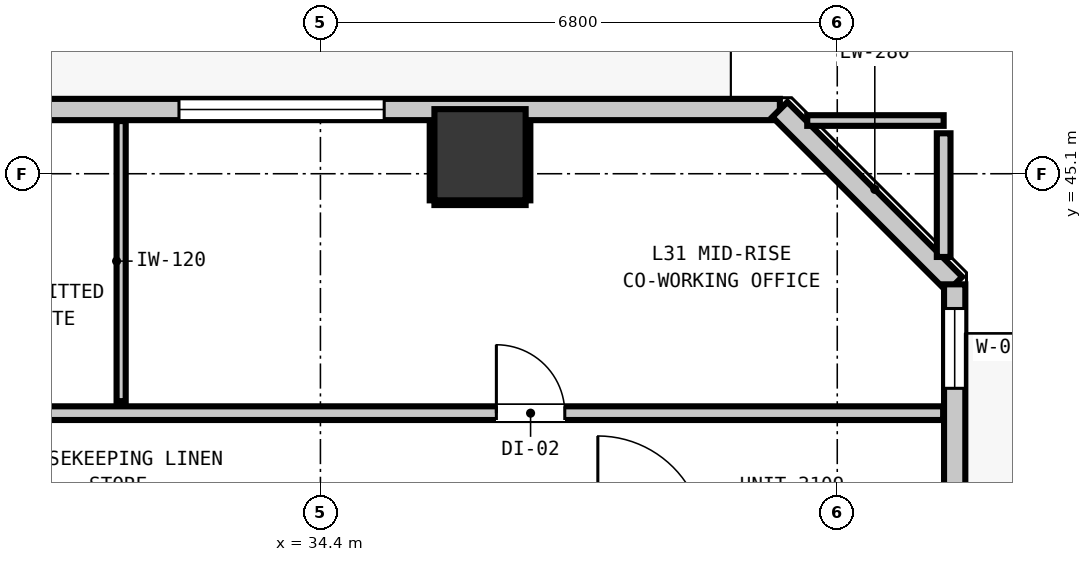
"""IFC4 building model, lengths in metres.
Left out: names, types, materials, properties, quantities, classifications, styles, units other than length and angle.
Written with IfcOpenShell. Run it as: python <this file> out.ifc"""

import sys

from ifc_helpers import new_model, si_unit, direction, frame, frame_2d, origin, origin_2d, place, context, subcontext, project, spatial, rectangle, extrude, element, fill, save


model = new_model("IFC4")
c1 = context("Model", 3, precision=1e-05, world=origin(), true_north=direction((0.0, 1.0)))
c2 = subcontext(c1, "Body", "Model", "MODEL_VIEW")
j1 = project(units=[si_unit("LENGTHUNIT", "METRE"), si_unit("PLANEANGLEUNIT", "RADIAN")], contexts=[c1])
p1 = place(None, origin())
s1 = spatial("IfcSite", under=j1, at=p1, CompositionType="ELEMENT")
p2 = place(p1, origin())
s2 = spatial("IfcBuilding", under=s1, at=p2, CompositionType="ELEMENT")
p3 = place(p2, frame((0.0, 0.0, 109.4)))
s3 = spatial("IfcBuildingStorey", under=s2, at=p3, CompositionType="ELEMENT", Elevation=109.4)
p4 = place(p3, frame((36.5, 45.35, 0.0), z_axis=(0.0, 0.0, 1.0), x_axis=(1.0, 0.0, 0.0)))
e1 = element("IfcColumn", 1, at=p4, inside=s3, PredefinedType="COLUMN", context=c2, shape_type="SweptSolid", body=[
    extrude(rectangle(XDim=1.2, YDim=1.2, at=origin_2d()), origin(), (0.0, 0.0, 1.0), 3.32),
])
p5 = place(p3, frame((5.355, 45.945, 0.0), z_axis=(0.0, 0.0, 1.0), x_axis=(1.0, 0.0, 0.0)))
e2 = element("IfcWall", 2, at=p5, inside=s3, PredefinedType="STANDARD", context=c2, shape_type="SweptSolid", body=[
    extrude(rectangle(XDim=35.09, YDim=0.28, at=frame_2d((17.545, 0.0))), origin(), (0.0, 0.0, 1.0), 3.08),
])
p6 = place(p5, frame((0.904, 0.0, 0.0)))
e3 = element("IfcOpeningElement", 3, at=p6, cuts=e2, PredefinedType="OPENING", context=c2, shape_type="SweptSolid", body=[
    extrude(rectangle(XDim=1.0, YDim=2.15, at=frame_2d((0.5, 1.075))), frame((0.0, 0.15, 0.0), z_axis=(0.0, -1.0, 0.0), x_axis=(1.0, 0.0, 0.0)), (0.0, 0.0, 1.0), 0.3),
])
p7 = place(p5, frame((3.424, 0.0, 0.85)))
e4 = element("IfcOpeningElement", 4, at=p7, cuts=e2, PredefinedType="OPENING", context=c2, shape_type="SweptSolid", body=[
    extrude(rectangle(XDim=2.7, YDim=2.0, at=frame_2d((1.35, 1.0))), frame((0.0, 0.15, 0.0), z_axis=(0.0, -1.0, 0.0), x_axis=(1.0, 0.0, 0.0)), (0.0, 0.0, 1.0), 0.3),
])
p8 = place(p5, frame((18.295, 0.0, 0.85)))
e5 = element("IfcOpeningElement", 5, at=p8, cuts=e2, PredefinedType="OPENING", context=c2, shape_type="SweptSolid", body=[
    extrude(rectangle(XDim=2.7, YDim=2.0, at=frame_2d((1.35, 1.0))), frame((0.0, 0.15, 0.0), z_axis=(0.0, -1.0, 0.0), x_axis=(1.0, 0.0, 0.0)), (0.0, 0.0, 1.0), 0.3),
])
p9 = place(p5, frame((27.184, 0.0, 0.85)))
e6 = element("IfcOpeningElement", 6, at=p9, cuts=e2, PredefinedType="OPENING", context=c2, shape_type="SweptSolid", body=[
    extrude(rectangle(XDim=2.7, YDim=2.0, at=frame_2d((1.35, 1.0))), frame((0.0, 0.15, 0.0), z_axis=(0.0, -1.0, 0.0), x_axis=(1.0, 0.0, 0.0)), (0.0, 0.0, 1.0), 0.3),
])
p10 = place(p3, frame((40.445, 45.945, 0.0), z_axis=(0.0, 0.0, 1.0), x_axis=(0.707106781187, -0.707106781187, 0.0)))
e7 = element("IfcWall", 7, at=p10, inside=s3, PredefinedType="STANDARD", context=c2, shape_type="SweptSolid", body=[
    extrude(rectangle(XDim=3.253, YDim=0.28, at=frame_2d((1.626, 0.0))), origin(), (0.0, 0.0, 1.0), 3.08),
])
p11 = place(p3, frame((42.745, 43.645, 0.0), z_axis=(0.0, 0.0, 1.0), x_axis=(0.0, -1.0, 0.0)))
e8 = element("IfcWall", 8, at=p11, inside=s3, PredefinedType="STANDARD", context=c2, shape_type="SweptSolid", body=[
    extrude(rectangle(XDim=32.29, YDim=0.28, at=frame_2d((16.145, 0.0))), origin(), (0.0, 0.0, 1.0), 3.08),
])
p12 = place(p11, frame((6.871, 0.0, 0.0)))
e9 = element("IfcOpeningElement", 9, at=p12, cuts=e8, PredefinedType="OPENING", context=c2, shape_type="SweptSolid", body=[
    extrude(rectangle(XDim=1.0, YDim=2.15, at=frame_2d((0.5, 1.075))), frame((0.0, 0.15, 0.0), z_axis=(0.0, -1.0, 0.0), x_axis=(1.0, 0.0, 0.0)), (0.0, 0.0, 1.0), 0.3),
])
p13 = place(p11, frame((0.318, 0.0, 0.85)))
e10 = element("IfcOpeningElement", 10, at=p13, cuts=e8, PredefinedType="OPENING", context=c2, shape_type="SweptSolid", body=[
    extrude(rectangle(XDim=1.05, YDim=1.65, at=frame_2d((0.525, 0.825))), frame((0.0, 0.15, 0.0), z_axis=(0.0, -1.0, 0.0), x_axis=(1.0, 0.0, 0.0)), (0.0, 0.0, 1.0), 0.3),
])
p14 = place(p11, frame((16.37, 0.0, 0.85)))
e11 = element("IfcOpeningElement", 11, at=p14, cuts=e8, PredefinedType="OPENING", context=c2, shape_type="SweptSolid", body=[
    extrude(rectangle(XDim=2.7, YDim=2.0, at=frame_2d((1.35, 1.0))), frame((0.0, 0.15, 0.0), z_axis=(0.0, -1.0, 0.0), x_axis=(1.0, 0.0, 0.0)), (0.0, 0.0, 1.0), 0.3),
])
p15 = place(p11, frame((8.452, 0.0, 0.85)))
e12 = element("IfcOpeningElement", 12, at=p15, cuts=e8, PredefinedType="OPENING", context=c2, shape_type="SweptSolid", body=[
    extrude(rectangle(XDim=1.05, YDim=1.65, at=frame_2d((0.525, 0.825))), frame((0.0, 0.15, 0.0), z_axis=(0.0, -1.0, 0.0), x_axis=(1.0, 0.0, 0.0)), (0.0, 0.0, 1.0), 0.3),
])
p16 = place(p3, frame((12.979, 41.95, 0.0), z_axis=(0.0, 0.0, 1.0), x_axis=(1.0, 0.0, 0.0)))
e13 = element("IfcWall", 13, at=p16, inside=s3, PredefinedType="PARTITIONING", context=c2, shape_type="SweptSolid", body=[
    extrude(rectangle(XDim=29.614, YDim=0.18, at=frame_2d((14.807, 0.0))), origin(), (0.0, 0.0, 1.0), 3.08),
])
p17 = place(p16, frame((11.521, 0.0, 0.0)))
e14 = element("IfcOpeningElement", 14, at=p17, cuts=e13, PredefinedType="OPENING", context=c2, shape_type="SweptSolid", body=[
    extrude(rectangle(XDim=1.0, YDim=2.15, at=frame_2d((0.5, 1.075))), frame((0.0, 0.1, 0.0), z_axis=(0.0, -1.0, 0.0), x_axis=(1.0, 0.0, 0.0)), (0.0, 0.0, 1.0), 0.2),
])
p18 = place(p16, frame((23.736, 0.0, 0.0)))
e15 = element("IfcOpeningElement", 15, at=p18, cuts=e13, PredefinedType="OPENING", context=c2, shape_type="SweptSolid", body=[
    extrude(rectangle(XDim=0.9, YDim=2.1, at=frame_2d((0.45, 1.05))), frame((0.0, 0.1, 0.0), z_axis=(0.0, -1.0, 0.0), x_axis=(1.0, 0.0, 0.0)), (0.0, 0.0, 1.0), 0.2),
])
p19 = place(p3, frame((40.805, 45.8, 0.0), z_axis=(0.0, 0.0, 1.0), x_axis=(1.0, 0.0, 0.0)))
e16 = element("IfcWall", 16, at=p19, inside=s3, PredefinedType="PARTITIONING", context=c2, shape_type="SweptSolid", body=[
    extrude(rectangle(XDim=1.795, YDim=0.14, at=frame_2d((0.897, 0.0))), origin(), (0.0, 0.0, 1.0), 3.08),
])
p20 = place(p3, frame((42.6, 44.005, 0.0), z_axis=(0.0, 0.0, 1.0), x_axis=(0.0, 1.0, 0.0)))
e17 = element("IfcWall", 17, at=p20, inside=s3, PredefinedType="PARTITIONING", context=c2, shape_type="SweptSolid", body=[
    extrude(rectangle(XDim=1.627, YDim=0.18, at=frame_2d((0.813, 0.0))), origin(), (0.0, 0.0, 1.0), 3.08),
])
p21 = place(p3, frame((31.778, 42.108, 0.0), z_axis=(0.0, 0.0, 1.0), x_axis=(0.0, 1.0, 0.0)))
e18 = element("IfcWall", 18, at=p21, inside=s3, PredefinedType="PARTITIONING", context=c2, shape_type="SweptSolid", body=[
    extrude(rectangle(XDim=3.685, YDim=0.12, at=frame_2d((1.843, 0.0))), origin(), (0.0, 0.0, 1.0), 3.08),
])
p22 = place(p3, frame((35.9, 44.718, 0.0), z_axis=(0.0, 0.0, 1.0), x_axis=(1.0, 0.0, 0.0)))
e19 = element("IfcWall", 19, at=p22, inside=s3, PredefinedType="PARTITIONING", context=c2, shape_type="SweptSolid", body=[
    extrude(rectangle(XDim=1.2, YDim=0.06, at=frame_2d((0.6, 0.0))), origin(), (0.0, 0.0, 1.0), 1.45),
])
for number, where, z_axis, x_axis in (
    (20, (35.868, 44.75, 0.0), (0.0, 0.0, 1.0), (0.0, 1.0, 0.0)),
    (21, (37.132, 44.75, 0.0), (0.0, 0.0, 1.0), (0.0, 1.0, 0.0)),
):
    element("IfcWall", number, at=place(p3, frame(where, z_axis=z_axis, x_axis=x_axis)), inside=s3, PredefinedType="PARTITIONING", context=c2, shape_type="SweptSolid", body=[
        extrude(rectangle(XDim=1.04, YDim=0.06, at=frame_2d((0.52, 0.0))), origin(), (0.0, 0.0, 1.0), 1.45),
    ])
p23 = place(p9, origin())
e22 = element("IfcWindow", 22, at=p23, inside=s3, PartitioningType="SINGLE_PANEL", PredefinedType="WINDOW", context=c2, shape_type="SweptSolid", body=[
    extrude(rectangle(XDim=2.7, YDim=2.0, at=frame_2d((1.35, 1.0))), frame((0.0, 0.03, 0.0), z_axis=(0.0, -1.0, 0.0), x_axis=(1.0, 0.0, 0.0)), (0.0, 0.0, 1.0), 0.06),
])
fill(e6, e22)
p24 = place(p13, origin())
e23 = element("IfcWindow", 23, at=p24, inside=s3, PartitioningType="SINGLE_PANEL", PredefinedType="WINDOW", context=c2, shape_type="SweptSolid", body=[
    extrude(rectangle(XDim=1.05, YDim=1.65, at=frame_2d((0.525, 0.825))), frame((0.0, 0.03, 0.0), z_axis=(0.0, -1.0, 0.0), x_axis=(1.0, 0.0, 0.0)), (0.0, 0.0, 1.0), 0.06),
])
fill(e10, e23)
p25 = place(p18, origin())
e24 = element("IfcDoor", 24, at=p25, inside=s3, OperationType="SINGLE_SWING_LEFT", PredefinedType="DOOR", context=c2, shape_type="SweptSolid", body=[
    extrude(rectangle(XDim=0.9, YDim=2.1, at=frame_2d((0.45, 1.05))), frame((0.0, 0.025, 0.0), z_axis=(0.0, -1.0, 0.0), x_axis=(1.0, 0.0, 0.0)), (0.0, 0.0, 1.0), 0.05),
])
fill(e15, e24)
save(model, sys.argv[1])
